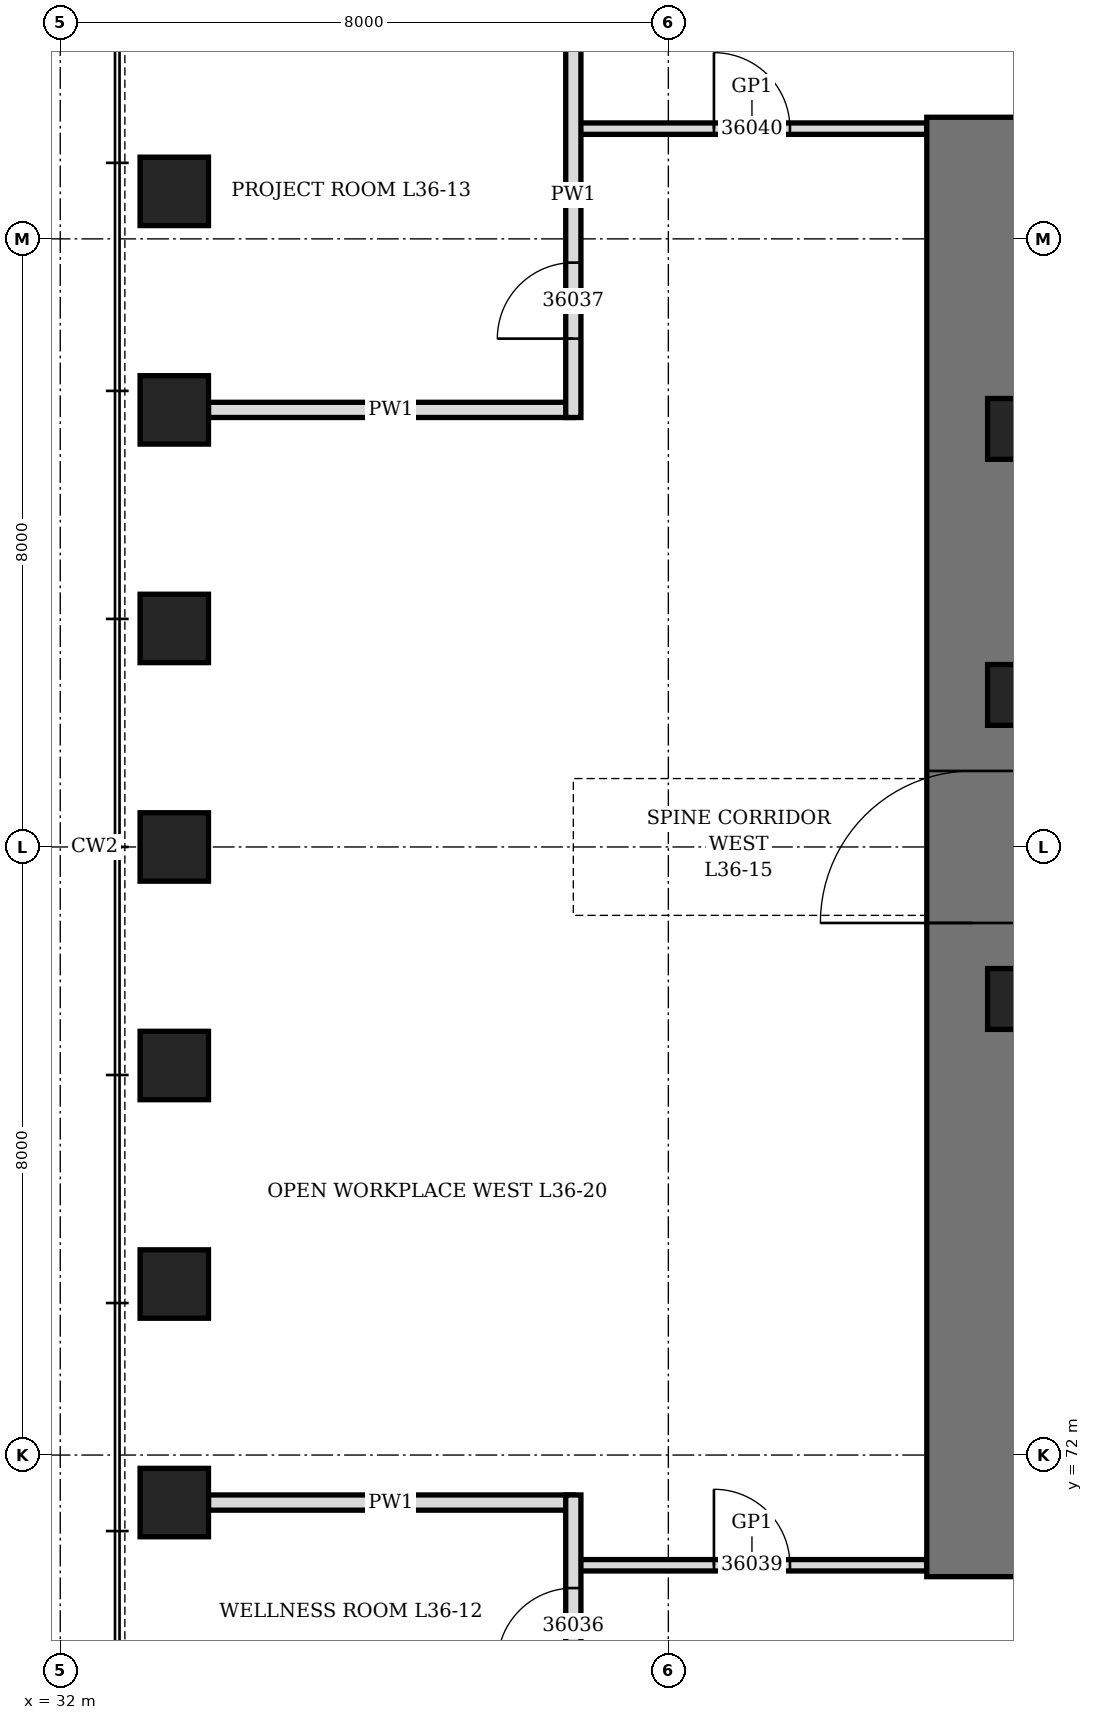
"""IFC4 building model, lengths in metres.
Left out: names, types, materials, properties, quantities, classifications, styles, units other than length and angle.
Written with IfcOpenShell. Run it as: python <this file> out.ifc"""

import sys

from ifc_helpers import new_model, si_unit, direction, frame, frame_2d, origin, origin_2d, place, context, subcontext, project, spatial, rectangle, hollow_rectangle, extrude, element, fill, save


model = new_model("IFC4")
c1 = context("Model", 3, precision=1e-05, world=origin(), true_north=direction((0.0, 1.0)))
c2 = subcontext(c1, "Body", "Model", "MODEL_VIEW")
j1 = project(units=[si_unit("LENGTHUNIT", "METRE"), si_unit("PLANEANGLEUNIT", "RADIAN")], contexts=[c1])
p1 = place(None, origin())
s1 = spatial("IfcSite", under=j1, at=p1, CompositionType="ELEMENT")
p2 = place(p1, origin())
s2 = spatial("IfcBuilding", under=s1, at=p2, CompositionType="ELEMENT")
p3 = place(p2, frame((0.0, 0.0, 162.7)))
s3 = spatial("IfcBuildingStorey", under=s2, at=p3, CompositionType="ELEMENT", Elevation=162.7)
for number, where, z_axis, x_axis in (
    (1, (33.5, 88.625, 0.0), (0.0, 0.0, 1.0), (0.0, 1.0, 0.0)),
    (2, (33.5, 85.75, 0.0), (0.0, 0.0, 1.0), (0.0, 1.0, 0.0)),
    (3, (33.5, 82.875, 0.0), (0.0, 0.0, 1.0), (0.0, 1.0, 0.0)),
    (4, (33.5, 80.0, 0.0), (0.0, 0.0, 1.0), (0.0, 1.0, 0.0)),
    (5, (33.5, 77.125, 0.0), (0.0, 0.0, 1.0), (0.0, 1.0, 0.0)),
    (6, (33.5, 74.25, 0.0), (0.0, 0.0, 1.0), (0.0, 1.0, 0.0)),
    (7, (33.5, 71.375, 0.0), (0.0, 0.0, 1.0), (0.0, 1.0, 0.0)),
):
    element("IfcColumn", number, at=place(p3, frame(where, z_axis=z_axis, x_axis=x_axis)), inside=s3, PredefinedType="COLUMN", context=c2, shape_type="SweptSolid", body=[
        extrude(hollow_rectangle(XDim=0.9, YDim=0.9, WallThickness=0.12, at=origin_2d()), origin(), (0.0, 0.0, 1.0), 4.2),
    ])
p4 = place(p3, frame((44.0, 70.4, 0.0), z_axis=(0.0, 0.0, 1.0), x_axis=(0.0, 1.0, 0.0)))
e8 = element("IfcWall", 8, at=p4, inside=s3, PredefinedType="SHEAR", context=c2, shape_type="SweptSolid", body=[
    extrude(rectangle(XDim=19.2, YDim=1.2, at=frame_2d((9.6, 0.0))), origin(), (0.0, 0.0, 1.0), 4.2),
])
p5 = place(p4, frame((8.6, 0.0, 0.0)))
e9 = element("IfcOpeningElement", 9, at=p5, cuts=e8, PredefinedType="OPENING", context=c2, shape_type="SweptSolid", body=[
    extrude(rectangle(XDim=2.0, YDim=2.4, at=frame_2d((1.0, 1.2))), frame((0.0, 0.61, 0.0), z_axis=(0.0, -1.0, 0.0), x_axis=(1.0, 0.0, 0.0)), (0.0, 0.0, 1.0), 1.22),
])
for number, where, z_axis, x_axis in (
    (10, (44.6, 78.0, 0.0), (0.0, 0.0, 1.0), (1.0, 0.0, 0.0)),
    (11, (44.6, 82.0, 0.0), (0.0, 0.0, 1.0), (1.0, 0.0, 0.0)),
    (12, (44.6, 85.5, 0.0), (0.0, 0.0, 1.0), (1.0, 0.0, 0.0)),
):
    element("IfcColumn", number, at=place(p3, frame(where, z_axis=z_axis, x_axis=x_axis)), inside=s3, PredefinedType="COLUMN", context=c2, shape_type="SweptSolid", body=[
        extrude(hollow_rectangle(XDim=0.8, YDim=0.8, WallThickness=0.1, at=origin_2d()), origin(), (0.0, 0.0, 1.0), 4.2),
    ])
for number, where, z_axis, x_axis in (
    (13, (33.95, 71.375, 0.0), (0.0, 0.0, 1.0), (1.0, 0.0, 0.0)),
    (14, (33.95, 85.75, 0.0), (0.0, 0.0, 1.0), (1.0, 0.0, 0.0)),
):
    element("IfcWall", number, at=place(p3, frame(where, z_axis=z_axis, x_axis=x_axis)), inside=s3, PredefinedType="PARTITIONING", context=c2, shape_type="SweptSolid", body=[
        extrude(rectangle(XDim=4.8, YDim=0.2, at=frame_2d((2.4, 0.0))), origin(), (0.0, 0.0, 1.0), 3.428),
    ])
p6 = place(p3, frame((38.8, 70.55, 0.0), z_axis=(0.0, 0.0, 1.0), x_axis=(1.0, 0.0, 0.0)))
e15 = element("IfcWall", 15, at=p6, inside=s3, PredefinedType="PARTITIONING", context=c2, shape_type="SweptSolid", body=[
    extrude(rectangle(XDim=4.6, YDim=0.15, at=frame_2d((2.3, 0.0))), origin(), (0.0, 0.0, 1.0), 4.04),
])
p7 = place(p6, frame((1.8, 0.0, 0.0)))
e16 = element("IfcOpeningElement", 16, at=p7, cuts=e15, PredefinedType="OPENING", context=c2, shape_type="SweptSolid", body=[
    extrude(rectangle(XDim=1.0, YDim=2.4, at=frame_2d((0.5, 1.2))), frame((0.0, 0.085, 0.0), z_axis=(0.0, -1.0, 0.0), x_axis=(1.0, 0.0, 0.0)), (0.0, 0.0, 1.0), 0.17),
])
p8 = place(p3, frame((38.8, 89.45, 0.0), z_axis=(0.0, 0.0, 1.0), x_axis=(1.0, 0.0, 0.0)))
e17 = element("IfcWall", 17, at=p8, inside=s3, PredefinedType="PARTITIONING", context=c2, shape_type="SweptSolid", body=[
    extrude(rectangle(XDim=4.6, YDim=0.15, at=frame_2d((2.3, 0.0))), origin(), (0.0, 0.0, 1.0), 4.04),
])
p9 = place(p8, frame((1.8, 0.0, 0.0)))
e18 = element("IfcOpeningElement", 18, at=p9, cuts=e17, PredefinedType="OPENING", context=c2, shape_type="SweptSolid", body=[
    extrude(rectangle(XDim=1.0, YDim=2.4, at=frame_2d((0.5, 1.2))), frame((0.0, 0.085, 0.0), z_axis=(0.0, -1.0, 0.0), x_axis=(1.0, 0.0, 0.0)), (0.0, 0.0, 1.0), 0.17),
])
p10 = place(p3, frame((38.75, 63.2, 0.0), z_axis=(0.0, 0.0, 1.0), x_axis=(0.0, 1.0, 0.0)))
e19 = element("IfcWall", 19, at=p10, inside=s3, PredefinedType="PARTITIONING", context=c2, shape_type="SweptSolid", body=[
    extrude(rectangle(XDim=8.275, YDim=0.2, at=frame_2d((4.138, 0.0))), origin(), (0.0, 0.0, 1.0), 4.04),
])
p11 = place(p10, frame((0.488, 0.0, 0.0)))
e20 = element("IfcOpeningElement", 20, at=p11, cuts=e19, PredefinedType="OPENING", context=c2, shape_type="SweptSolid", body=[
    extrude(rectangle(XDim=1.0, YDim=2.1, at=frame_2d((0.5, 1.05))), frame((0.0, 0.11, 0.0), z_axis=(0.0, -1.0, 0.0), x_axis=(1.0, 0.0, 0.0)), (0.0, 0.0, 1.0), 0.22),
])
p12 = place(p10, frame((6.05, 0.0, 0.0)))
e21 = element("IfcOpeningElement", 21, at=p12, cuts=e19, PredefinedType="OPENING", context=c2, shape_type="SweptSolid", body=[
    extrude(rectangle(XDim=1.0, YDim=2.1, at=frame_2d((0.5, 1.05))), frame((0.0, 0.11, 0.0), z_axis=(0.0, -1.0, 0.0), x_axis=(1.0, 0.0, 0.0)), (0.0, 0.0, 1.0), 0.22),
])
p13 = place(p3, frame((38.75, 85.65, 0.0), z_axis=(0.0, 0.0, 1.0), x_axis=(0.0, 1.0, 0.0)))
e22 = element("IfcWall", 22, at=p13, inside=s3, PredefinedType="PARTITIONING", context=c2, shape_type="SweptSolid", body=[
    extrude(rectangle(XDim=5.85, YDim=0.2, at=frame_2d((2.925, 0.0))), origin(), (0.0, 0.0, 1.0), 4.04),
])
p14 = place(p13, frame((1.038, 0.0, 0.0)))
e23 = element("IfcOpeningElement", 23, at=p14, cuts=e22, PredefinedType="OPENING", context=c2, shape_type="SweptSolid", body=[
    extrude(rectangle(XDim=1.0, YDim=2.1, at=frame_2d((0.5, 1.05))), frame((0.0, 0.11, 0.0), z_axis=(0.0, -1.0, 0.0), x_axis=(1.0, 0.0, 0.0)), (0.0, 0.0, 1.0), 0.22),
])
p15 = place(p5, origin())
e24 = element("IfcDoor", 24, at=p15, inside=s3, OperationType="DOUBLE_DOOR_SINGLE_SWING", PredefinedType="DOOR", context=c2, shape_type="SweptSolid", body=[
    extrude(rectangle(XDim=2.0, YDim=2.4, at=frame_2d((1.0, 1.2))), frame((0.0, 0.35, 0.0), z_axis=(0.0, -1.0, 0.0), x_axis=(1.0, 0.0, 0.0)), (0.0, 0.0, 1.0), 0.7),
])
fill(e9, e24)
p16 = place(p12, origin())
e25 = element("IfcDoor", 25, at=p16, inside=s3, OperationType="SINGLE_SWING_LEFT", PredefinedType="DOOR", context=c2, shape_type="SweptSolid", body=[
    extrude(rectangle(XDim=1.0, YDim=2.1, at=frame_2d((0.5, 1.05))), frame((0.0, 0.1, 0.0), z_axis=(0.0, -1.0, 0.0), x_axis=(1.0, 0.0, 0.0)), (0.0, 0.0, 1.0), 0.199),
])
fill(e21, e25)
p17 = place(p14, origin())
e26 = element("IfcDoor", 26, at=p17, inside=s3, OperationType="SINGLE_SWING_LEFT", PredefinedType="DOOR", context=c2, shape_type="SweptSolid", body=[
    extrude(rectangle(XDim=1.0, YDim=2.1, at=frame_2d((0.5, 1.05))), frame((0.0, 0.1, 0.0), z_axis=(0.0, -1.0, 0.0), x_axis=(1.0, 0.0, 0.0)), (0.0, 0.0, 1.0), 0.199),
])
fill(e23, e26)
p18 = place(p7, origin())
e27 = element("IfcDoor", 27, at=p18, inside=s3, OperationType="SINGLE_SWING_RIGHT", PredefinedType="DOOR", context=c2, shape_type="SweptSolid", body=[
    extrude(rectangle(XDim=1.0, YDim=2.4, at=frame_2d((0.5, 1.2))), frame((0.0, 0.075, 0.0), z_axis=(0.0, -1.0, 0.0), x_axis=(1.0, 0.0, 0.0)), (0.0, 0.0, 1.0), 0.149),
])
fill(e16, e27)
p19 = place(p9, origin())
e28 = element("IfcDoor", 28, at=p19, inside=s3, OperationType="SINGLE_SWING_RIGHT", PredefinedType="DOOR", context=c2, shape_type="SweptSolid", body=[
    extrude(rectangle(XDim=1.0, YDim=2.4, at=frame_2d((0.5, 1.2))), frame((0.0, 0.075, 0.0), z_axis=(0.0, -1.0, 0.0), x_axis=(1.0, 0.0, 0.0)), (0.0, 0.0, 1.0), 0.149),
])
fill(e18, e28)
save(model, sys.argv[1])
